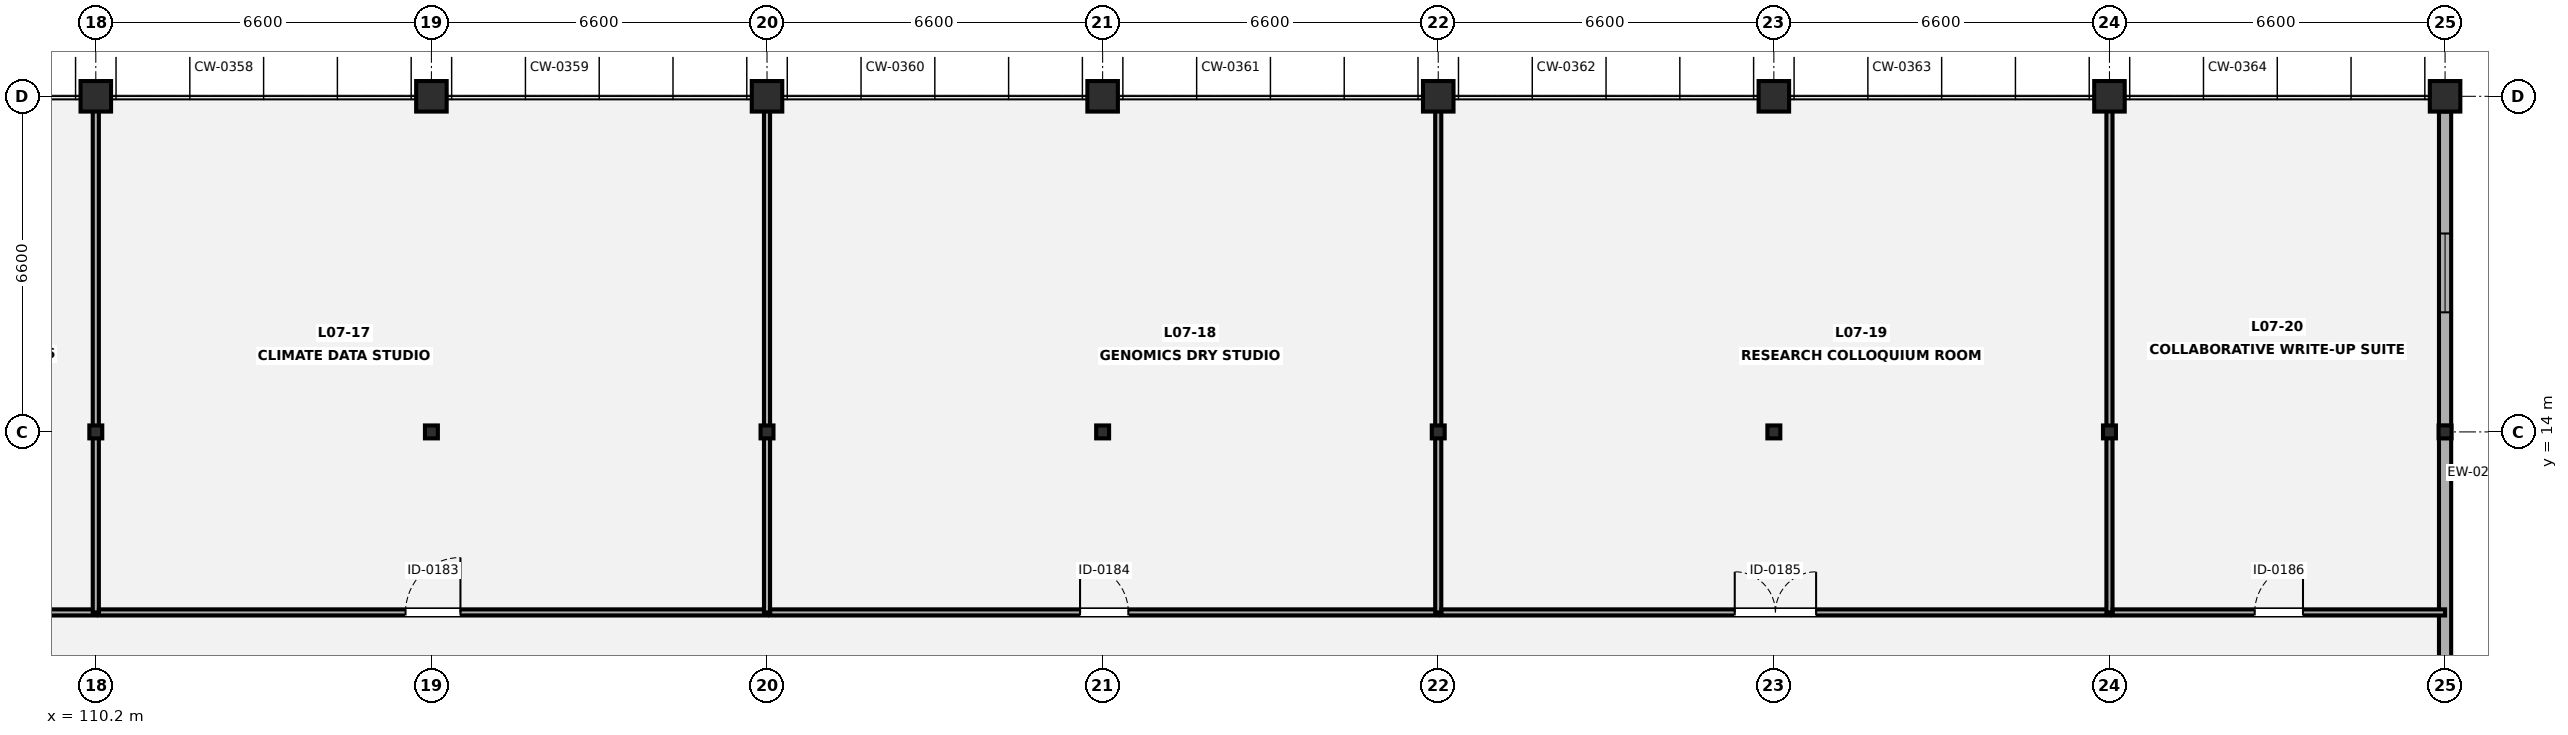
"""IFC4 building model, lengths in metres.
Left out: names, types, materials, properties, quantities, classifications, styles, units other than length and angle.
Written with IfcOpenShell. Run it as: python <this file> out.ifc"""

import sys

from ifc_helpers import new_model, si_unit, direction, frame, frame_2d, origin, origin_2d, place, context, subcontext, project, spatial, rectangle, circle, i_section, extrude, element, fill, save


model = new_model("IFC4")
c1 = context("Model", 3, precision=1e-05, world=origin(), true_north=direction((0.0, 1.0)))
c2 = subcontext(c1, "Body", "Model", "MODEL_VIEW")
j1 = project(units=[si_unit("LENGTHUNIT", "METRE"), si_unit("PLANEANGLEUNIT", "RADIAN")], contexts=[c1])
p1 = place(None, origin())
s1 = spatial("IfcSite", under=j1, at=p1, CompositionType="ELEMENT")
p2 = place(p1, origin())
s2 = spatial("IfcBuilding", under=s1, at=p2, CompositionType="ELEMENT")
p3 = place(p2, frame((0.0, 0.0, 30.1)))
s3 = spatial("IfcBuildingStorey", under=s2, at=p3, CompositionType="ELEMENT", Elevation=30.1)
p4 = place(p3, frame((110.2, 14.0, 0.0), z_axis=(0.0, 0.0, 1.0), x_axis=(1.0, 0.0, 0.0)))
e1 = element("IfcColumn", 1, at=p4, inside=s3, PredefinedType="COLUMN", context=c2, shape_type="SweptSolid", body=[
    extrude(i_section(OverallWidth=0.254, OverallDepth=0.254, WebThickness=0.009, FlangeThickness=0.014, FilletRadius=0.014, at=origin_2d()), origin(), (0.0, 0.0, 1.0), 4.2),
])
p5 = place(p3, frame((110.2, 20.6, 0.0), z_axis=(0.0, 0.0, 1.0), x_axis=(1.0, 0.0, 0.0)))
e2 = element("IfcColumn", 2, at=p5, inside=s3, PredefinedType="PILASTER", context=c2, shape_type="SweptSolid", body=[
    extrude(circle(Radius=0.3, at=origin_2d()), origin(), (0.0, 0.0, 1.0), 4.2),
])
p6 = place(p3, frame((116.8, 14.0, 0.0), z_axis=(0.0, 0.0, 1.0), x_axis=(1.0, 0.0, 0.0)))
e3 = element("IfcColumn", 3, at=p6, inside=s3, PredefinedType="COLUMN", context=c2, shape_type="SweptSolid", body=[
    extrude(i_section(OverallWidth=0.254, OverallDepth=0.254, WebThickness=0.009, FlangeThickness=0.014, FilletRadius=0.014, at=origin_2d()), origin(), (0.0, 0.0, 1.0), 4.2),
])
p7 = place(p3, frame((116.8, 20.6, 0.0), z_axis=(0.0, 0.0, 1.0), x_axis=(1.0, 0.0, 0.0)))
e4 = element("IfcColumn", 4, at=p7, inside=s3, PredefinedType="PILASTER", context=c2, shape_type="SweptSolid", body=[
    extrude(circle(Radius=0.3, at=origin_2d()), origin(), (0.0, 0.0, 1.0), 4.2),
])
p8 = place(p3, frame((123.4, 14.0, 0.0), z_axis=(0.0, 0.0, 1.0), x_axis=(1.0, 0.0, 0.0)))
e5 = element("IfcColumn", 5, at=p8, inside=s3, PredefinedType="COLUMN", context=c2, shape_type="SweptSolid", body=[
    extrude(i_section(OverallWidth=0.254, OverallDepth=0.254, WebThickness=0.009, FlangeThickness=0.014, FilletRadius=0.014, at=origin_2d()), origin(), (0.0, 0.0, 1.0), 4.2),
])
p9 = place(p3, frame((123.4, 20.6, 0.0), z_axis=(0.0, 0.0, 1.0), x_axis=(1.0, 0.0, 0.0)))
e6 = element("IfcColumn", 6, at=p9, inside=s3, PredefinedType="PILASTER", context=c2, shape_type="SweptSolid", body=[
    extrude(circle(Radius=0.3, at=origin_2d()), origin(), (0.0, 0.0, 1.0), 4.2),
])
p10 = place(p3, frame((130.0, 14.0, 0.0), z_axis=(0.0, 0.0, 1.0), x_axis=(1.0, 0.0, 0.0)))
e7 = element("IfcColumn", 7, at=p10, inside=s3, PredefinedType="COLUMN", context=c2, shape_type="SweptSolid", body=[
    extrude(i_section(OverallWidth=0.254, OverallDepth=0.254, WebThickness=0.009, FlangeThickness=0.014, FilletRadius=0.014, at=origin_2d()), origin(), (0.0, 0.0, 1.0), 4.2),
])
p11 = place(p3, frame((130.0, 20.6, 0.0), z_axis=(0.0, 0.0, 1.0), x_axis=(1.0, 0.0, 0.0)))
e8 = element("IfcColumn", 8, at=p11, inside=s3, PredefinedType="PILASTER", context=c2, shape_type="SweptSolid", body=[
    extrude(circle(Radius=0.3, at=origin_2d()), origin(), (0.0, 0.0, 1.0), 4.2),
])
p12 = place(p3, frame((136.6, 14.0, 0.0), z_axis=(0.0, 0.0, 1.0), x_axis=(1.0, 0.0, 0.0)))
e9 = element("IfcColumn", 9, at=p12, inside=s3, PredefinedType="COLUMN", context=c2, shape_type="SweptSolid", body=[
    extrude(i_section(OverallWidth=0.254, OverallDepth=0.254, WebThickness=0.009, FlangeThickness=0.014, FilletRadius=0.014, at=origin_2d()), origin(), (0.0, 0.0, 1.0), 4.2),
])
p13 = place(p3, frame((136.6, 20.6, 0.0), z_axis=(0.0, 0.0, 1.0), x_axis=(1.0, 0.0, 0.0)))
e10 = element("IfcColumn", 10, at=p13, inside=s3, PredefinedType="PILASTER", context=c2, shape_type="SweptSolid", body=[
    extrude(circle(Radius=0.3, at=origin_2d()), origin(), (0.0, 0.0, 1.0), 4.2),
])
p14 = place(p3, frame((143.2, 14.0, 0.0), z_axis=(0.0, 0.0, 1.0), x_axis=(1.0, 0.0, 0.0)))
e11 = element("IfcColumn", 11, at=p14, inside=s3, PredefinedType="COLUMN", context=c2, shape_type="SweptSolid", body=[
    extrude(i_section(OverallWidth=0.254, OverallDepth=0.254, WebThickness=0.009, FlangeThickness=0.014, FilletRadius=0.014, at=origin_2d()), origin(), (0.0, 0.0, 1.0), 4.2),
])
p15 = place(p3, frame((143.2, 20.6, 0.0), z_axis=(0.0, 0.0, 1.0), x_axis=(1.0, 0.0, 0.0)))
e12 = element("IfcColumn", 12, at=p15, inside=s3, PredefinedType="PILASTER", context=c2, shape_type="SweptSolid", body=[
    extrude(circle(Radius=0.3, at=origin_2d()), origin(), (0.0, 0.0, 1.0), 4.2),
])
p16 = place(p3, frame((149.8, 14.0, 0.0), z_axis=(0.0, 0.0, 1.0), x_axis=(1.0, 0.0, 0.0)))
e13 = element("IfcColumn", 13, at=p16, inside=s3, PredefinedType="COLUMN", context=c2, shape_type="SweptSolid", body=[
    extrude(i_section(OverallWidth=0.254, OverallDepth=0.254, WebThickness=0.009, FlangeThickness=0.014, FilletRadius=0.014, at=origin_2d()), origin(), (0.0, 0.0, 1.0), 4.2),
])
p17 = place(p3, frame((149.8, 20.6, 0.0), z_axis=(0.0, 0.0, 1.0), x_axis=(1.0, 0.0, 0.0)))
e14 = element("IfcColumn", 14, at=p17, inside=s3, PredefinedType="PILASTER", context=c2, shape_type="SweptSolid", body=[
    extrude(circle(Radius=0.3, at=origin_2d()), origin(), (0.0, 0.0, 1.0), 4.2),
])
p18 = place(p3, frame((156.4, 14.0, 0.0), z_axis=(0.0, 0.0, 1.0), x_axis=(1.0, 0.0, 0.0)))
e15 = element("IfcColumn", 15, at=p18, inside=s3, PredefinedType="COLUMN", context=c2, shape_type="SweptSolid", body=[
    extrude(i_section(OverallWidth=0.254, OverallDepth=0.254, WebThickness=0.009, FlangeThickness=0.014, FilletRadius=0.014, at=origin_2d()), origin(), (0.0, 0.0, 1.0), 3.92),
])
p19 = place(p3, frame((156.4, 20.6, 0.0), z_axis=(0.0, 0.0, 1.0), x_axis=(1.0, 0.0, 0.0)))
e16 = element("IfcColumn", 16, at=p19, inside=s3, PredefinedType="PILASTER", context=c2, shape_type="SweptSolid", body=[
    extrude(circle(Radius=0.3, at=origin_2d()), origin(), (0.0, 0.0, 1.0), 3.92),
])
p20 = place(p3, frame((156.4, 20.302, 0.0), z_axis=(0.0, 0.0, 1.0), x_axis=(0.0, -1.0, 0.0)))
e17 = element("IfcWall", 17, at=p20, inside=s3, PredefinedType="SOLIDWALL", context=c2, shape_type="SweptSolid", body=[
    extrude(rectangle(XDim=19.204, YDim=0.24, at=frame_2d((9.602, 0.0))), origin(), (0.0, 0.0, 1.0), 3.372),
])
p21 = place(p20, frame((2.4, 0.0, 0.85)))
e18 = element("IfcOpeningElement", 18, at=p21, cuts=e17, PredefinedType="OPENING", context=c2, shape_type="SweptSolid", body=[
    extrude(rectangle(XDim=1.55, YDim=1.4, at=frame_2d((0.775, 0.7))), frame((0.0, 0.13, 0.0), z_axis=(0.0, -1.0, 0.0), x_axis=(1.0, 0.0, 0.0)), (0.0, 0.0, 1.0), 0.26),
])
p22 = place(p20, frame((15.1, 0.0, 0.85)))
e19 = element("IfcOpeningElement", 19, at=p22, cuts=e17, PredefinedType="OPENING", context=c2, shape_type="SweptSolid", body=[
    extrude(rectangle(XDim=1.95, YDim=1.5, at=frame_2d((0.975, 0.75))), frame((0.0, 0.13, 0.0), z_axis=(0.0, -1.0, 0.0), x_axis=(1.0, 0.0, 0.0)), (0.0, 0.0, 1.0), 0.26),
])
p23 = place(p3, frame((103.6, 10.45, 0.0), z_axis=(0.0, 0.0, 1.0), x_axis=(1.0, 0.0, 0.0)))
e20 = element("IfcWall", 20, at=p23, inside=s3, PredefinedType="PARTITIONING", context=c2, shape_type="SweptSolid", body=[
    extrude(rectangle(XDim=6.6, YDim=0.12, at=frame_2d((3.3, 0.0))), origin(), (0.0, 0.0, 1.0), 3.546),
])
p24 = place(p23, frame((2.825, 0.0, 0.0)))
e21 = element("IfcOpeningElement", 21, at=p24, cuts=e20, PredefinedType="OPENING", context=c2, shape_type="SweptSolid", body=[
    extrude(rectangle(XDim=0.95, YDim=2.1, at=frame_2d((0.475, 1.05))), frame((0.0, 0.07, 0.0), z_axis=(0.0, -1.0, 0.0), x_axis=(1.0, 0.0, 0.0)), (0.0, 0.0, 1.0), 0.14),
])
p25 = place(p3, frame((110.2, 10.45, 0.0), z_axis=(0.0, 0.0, 1.0), x_axis=(0.0, 1.0, 0.0)))
e22 = element("IfcWall", 22, at=p25, inside=s3, PredefinedType="PARTITIONING", context=c2, shape_type="SweptSolid", body=[
    extrude(rectangle(XDim=10.15, YDim=0.12, at=frame_2d((5.075, 0.0))), origin(), (0.0, 0.0, 1.0), 3.372),
])
p26 = place(p3, frame((110.262, 10.45, 0.0), z_axis=(0.0, 0.0, 1.0), x_axis=(1.0, 0.0, 0.0)))
e23 = element("IfcWall", 23, at=p26, inside=s3, PredefinedType="PARTITIONING", context=c2, shape_type="SweptSolid", body=[
    extrude(rectangle(XDim=13.138, YDim=0.12, at=frame_2d((6.569, 0.0))), origin(), (0.0, 0.0, 1.0), 3.546),
])
p27 = place(p26, frame((6.029, 0.0, 0.0)))
e24 = element("IfcOpeningElement", 24, at=p27, cuts=e23, PredefinedType="OPENING", context=c2, shape_type="SweptSolid", body=[
    extrude(rectangle(XDim=1.08, YDim=2.12, at=frame_2d((0.54, 1.06))), frame((0.0, 0.07, 0.0), z_axis=(0.0, -1.0, 0.0), x_axis=(1.0, 0.0, 0.0)), (0.0, 0.0, 1.0), 0.14),
])
p28 = place(p3, frame((123.4, 10.45, 0.0), z_axis=(0.0, 0.0, 1.0), x_axis=(0.0, 1.0, 0.0)))
e25 = element("IfcWall", 25, at=p28, inside=s3, PredefinedType="PARTITIONING", context=c2, shape_type="SweptSolid", body=[
    extrude(rectangle(XDim=10.15, YDim=0.12, at=frame_2d((5.075, 0.0))), origin(), (0.0, 0.0, 1.0), 3.372),
])
p29 = place(p3, frame((123.462, 10.45, 0.0), z_axis=(0.0, 0.0, 1.0), x_axis=(1.0, 0.0, 0.0)))
e26 = element("IfcWall", 26, at=p29, inside=s3, PredefinedType="PARTITIONING", context=c2, shape_type="SweptSolid", body=[
    extrude(rectangle(XDim=13.138, YDim=0.12, at=frame_2d((6.569, 0.0))), origin(), (0.0, 0.0, 1.0), 3.546),
])
p30 = place(p29, frame((6.094, 0.0, 0.0)))
e27 = element("IfcOpeningElement", 27, at=p30, cuts=e26, PredefinedType="OPENING", context=c2, shape_type="SweptSolid", body=[
    extrude(rectangle(XDim=0.95, YDim=2.1, at=frame_2d((0.475, 1.05))), frame((0.0, 0.07, 0.0), z_axis=(0.0, -1.0, 0.0), x_axis=(1.0, 0.0, 0.0)), (0.0, 0.0, 1.0), 0.14),
])
p31 = place(p3, frame((136.6, 10.45, 0.0), z_axis=(0.0, 0.0, 1.0), x_axis=(0.0, 1.0, 0.0)))
e28 = element("IfcWall", 28, at=p31, inside=s3, PredefinedType="PARTITIONING", context=c2, shape_type="SweptSolid", body=[
    extrude(rectangle(XDim=10.15, YDim=0.12, at=frame_2d((5.075, 0.0))), origin(), (0.0, 0.0, 1.0), 3.372),
])
p32 = place(p3, frame((136.662, 10.45, 0.0), z_axis=(0.0, 0.0, 1.0), x_axis=(1.0, 0.0, 0.0)))
e29 = element("IfcWall", 29, at=p32, inside=s3, PredefinedType="PARTITIONING", context=c2, shape_type="SweptSolid", body=[
    extrude(rectangle(XDim=13.138, YDim=0.12, at=frame_2d((6.569, 0.0))), origin(), (0.0, 0.0, 1.0), 3.546),
])
p33 = place(p32, frame((5.769, 0.0, 0.0)))
e30 = element("IfcOpeningElement", 30, at=p33, cuts=e29, PredefinedType="OPENING", context=c2, shape_type="SweptSolid", body=[
    extrude(rectangle(XDim=1.6, YDim=2.18, at=frame_2d((0.8, 1.09))), frame((0.0, 0.07, 0.0), z_axis=(0.0, -1.0, 0.0), x_axis=(1.0, 0.0, 0.0)), (0.0, 0.0, 1.0), 0.14),
])
p34 = place(p3, frame((149.8, 10.45, 0.0), z_axis=(0.0, 0.0, 1.0), x_axis=(0.0, 1.0, 0.0)))
e31 = element("IfcWall", 31, at=p34, inside=s3, PredefinedType="PARTITIONING", context=c2, shape_type="SweptSolid", body=[
    extrude(rectangle(XDim=10.15, YDim=0.12, at=frame_2d((5.075, 0.0))), origin(), (0.0, 0.0, 1.0), 3.372),
])
p35 = place(p3, frame((149.862, 10.45, 0.0), z_axis=(0.0, 0.0, 1.0), x_axis=(1.0, 0.0, 0.0)))
e32 = element("IfcWall", 32, at=p35, inside=s3, PredefinedType="PARTITIONING", context=c2, shape_type="SweptSolid", body=[
    extrude(rectangle(XDim=6.538, YDim=0.12, at=frame_2d((3.269, 0.0))), origin(), (0.0, 0.0, 1.0), 3.546),
])
p36 = place(p35, frame((2.794, 0.0, 0.0)))
e33 = element("IfcOpeningElement", 33, at=p36, cuts=e32, PredefinedType="OPENING", context=c2, shape_type="SweptSolid", body=[
    extrude(rectangle(XDim=0.95, YDim=2.1, at=frame_2d((0.475, 1.05))), frame((0.0, 0.07, 0.0), z_axis=(0.0, -1.0, 0.0), x_axis=(1.0, 0.0, 0.0)), (0.0, 0.0, 1.0), 0.14),
])
p37 = place(p21, origin())
e34 = element("IfcWindow", 34, at=p37, inside=s3, PartitioningType="SINGLE_PANEL", PredefinedType="WINDOW", context=c2, shape_type="SweptSolid", body=[
    extrude(rectangle(XDim=1.55, YDim=1.4, at=frame_2d((0.775, 0.7))), frame((0.0, 0.03, 0.0), z_axis=(0.0, -1.0, 0.0), x_axis=(1.0, 0.0, 0.0)), (0.0, 0.0, 1.0), 0.06),
])
fill(e18, e34)
p38 = place(p27, origin())
e35 = element("IfcDoor", 35, at=p38, inside=s3, OperationType="SINGLE_SWING_RIGHT", PredefinedType="DOOR", context=c2, shape_type="SweptSolid", body=[
    extrude(rectangle(XDim=1.08, YDim=2.12, at=frame_2d((0.54, 1.06))), frame((0.0, 0.025, 0.0), z_axis=(0.0, -1.0, 0.0), x_axis=(1.0, 0.0, 0.0)), (0.0, 0.0, 1.0), 0.05),
])
fill(e24, e35)
p39 = place(p30, origin())
e36 = element("IfcDoor", 36, at=p39, inside=s3, OperationType="SINGLE_SWING_LEFT", PredefinedType="DOOR", context=c2, shape_type="SweptSolid", body=[
    extrude(rectangle(XDim=0.95, YDim=2.1, at=frame_2d((0.475, 1.05))), frame((0.0, 0.025, 0.0), z_axis=(0.0, -1.0, 0.0), x_axis=(1.0, 0.0, 0.0)), (0.0, 0.0, 1.0), 0.05),
])
fill(e27, e36)
p40 = place(p33, origin())
e37 = element("IfcDoor", 37, at=p40, inside=s3, OperationType="DOUBLE_DOOR_SINGLE_SWING", PredefinedType="DOOR", context=c2, shape_type="SweptSolid", body=[
    extrude(rectangle(XDim=1.6, YDim=2.18, at=frame_2d((0.8, 1.09))), frame((0.0, 0.025, 0.0), z_axis=(0.0, -1.0, 0.0), x_axis=(1.0, 0.0, 0.0)), (0.0, 0.0, 1.0), 0.05),
])
fill(e30, e37)
p41 = place(p36, origin())
e38 = element("IfcDoor", 38, at=p41, inside=s3, OperationType="SINGLE_SWING_RIGHT", PredefinedType="DOOR", context=c2, shape_type="SweptSolid", body=[
    extrude(rectangle(XDim=0.95, YDim=2.1, at=frame_2d((0.475, 1.05))), frame((0.0, 0.025, 0.0), z_axis=(0.0, -1.0, 0.0), x_axis=(1.0, 0.0, 0.0)), (0.0, 0.0, 1.0), 0.05),
])
fill(e33, e38)
save(model, sys.argv[1])
